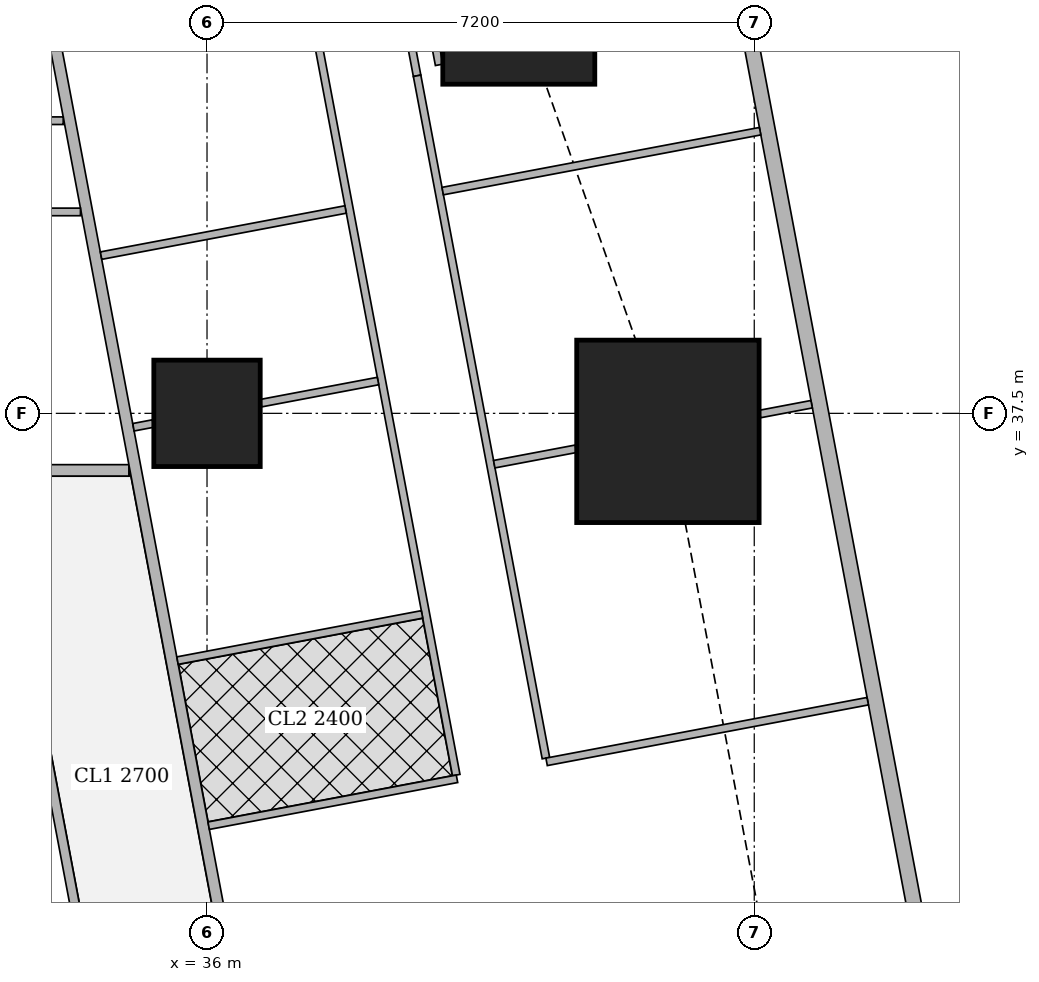
"""IFC4 building model, lengths in metres.
Left out: names, types, materials, properties, quantities, classifications, styles, units other than length and angle.
Written with IfcOpenShell. Run it as: python <this file> out.ifc"""

import sys

from ifc_helpers import new_model, si_unit, direction, frame, frame_2d, origin, origin_2d, place, context, subcontext, project, spatial, rectangle, extrude, element, fill, save


model = new_model("IFC4")
c1 = context("Model", 3, precision=1e-05, world=origin(), true_north=direction((0.0, 1.0)))
c2 = subcontext(c1, "Body", "Model", "MODEL_VIEW")
j1 = project(units=[si_unit("LENGTHUNIT", "METRE"), si_unit("PLANEANGLEUNIT", "RADIAN")], contexts=[c1])
p1 = place(None, origin())
s1 = spatial("IfcSite", under=j1, at=p1, CompositionType="ELEMENT")
p2 = place(p1, origin())
s2 = spatial("IfcBuilding", under=s1, at=p2, CompositionType="ELEMENT")
p3 = place(p2, frame((0.0, 0.0, 216.2)))
s3 = spatial("IfcBuildingStorey", under=s2, at=p3, CompositionType="ELEMENT", Elevation=216.2)
p4 = place(p3, frame((36.0, 37.5, 0.0), z_axis=(0.0, 0.0, 1.0), x_axis=(1.0, 0.0, 0.0)))
e1 = element("IfcColumn", 1, at=p4, inside=s3, PredefinedType="COLUMN", context=c2, shape_type="SweptSolid", body=[
    extrude(rectangle(XDim=1.4, YDim=1.4, at=origin_2d()), origin(), (0.0, 0.0, 1.0), 3.75),
])
p5 = place(p3, frame((42.064, 37.263, 0.0), z_axis=(0.0, 0.0, 1.0), x_axis=(1.0, 0.0, 0.0)))
e2 = element("IfcColumn", 2, at=p5, inside=s3, PredefinedType="COLUMN", context=c2, shape_type="SweptSolid", body=[
    extrude(rectangle(XDim=2.4, YDim=2.4, at=origin_2d()), origin(), (0.0, 0.0, 1.0), 3.75),
])
p6 = place(p3, frame((40.102, 42.83, 0.0), z_axis=(0.0, 0.0, 1.0), x_axis=(1.0, 0.0, 0.0)))
e3 = element("IfcColumn", 3, at=p6, inside=s3, PredefinedType="COLUMN", context=c2, shape_type="SweptSolid", body=[
    extrude(rectangle(XDim=2.0, YDim=2.0, at=origin_2d()), origin(), (0.0, 0.0, 1.0), 3.75),
])
p7 = place(p3, frame((50.653, 2.703, 0.0), z_axis=(0.0, 0.0, 1.0), x_axis=(-0.185612026696, 0.982623109613, 0.0)))
e4 = element("IfcWall", 4, at=p7, inside=s3, PredefinedType="SOLIDWALL", context=c2, shape_type="SweptSolid", body=[
    extrude(rectangle(XDim=41.393, YDim=0.2, at=frame_2d((20.697, 0.0))), origin(), (0.0, 0.0, 1.0), 3.5),
])
p8 = place(p7, frame((1.633, 0.0, 0.9)))
e5 = element("IfcOpeningElement", 5, at=p8, cuts=e4, PredefinedType="OPENING", context=c2, shape_type="SweptSolid", body=[
    extrude(rectangle(XDim=1.8, YDim=1.5, at=frame_2d((0.9, 0.75))), frame((0.0, 0.11, 0.0), z_axis=(0.0, -1.0, 0.0), x_axis=(1.0, 0.0, 0.0)), (0.0, 0.0, 1.0), 0.22),
])
p9 = place(p7, frame((6.032, 0.0, 0.9)))
e6 = element("IfcOpeningElement", 6, at=p9, cuts=e4, PredefinedType="OPENING", context=c2, shape_type="SweptSolid", body=[
    extrude(rectangle(XDim=1.8, YDim=1.5, at=frame_2d((0.9, 0.75))), frame((0.0, 0.11, 0.0), z_axis=(0.0, -1.0, 0.0), x_axis=(1.0, 0.0, 0.0)), (0.0, 0.0, 1.0), 0.22),
])
p10 = place(p7, frame((9.848, 0.0, 0.9)))
e7 = element("IfcOpeningElement", 7, at=p10, cuts=e4, PredefinedType="OPENING", context=c2, shape_type="SweptSolid", body=[
    extrude(rectangle(XDim=1.8, YDim=1.5, at=frame_2d((0.9, 0.75))), frame((0.0, 0.11, 0.0), z_axis=(0.0, -1.0, 0.0), x_axis=(1.0, 0.0, 0.0)), (0.0, 0.0, 1.0), 0.22),
])
p11 = place(p7, frame((13.664, 0.0, 0.9)))
e8 = element("IfcOpeningElement", 8, at=p11, cuts=e4, PredefinedType="OPENING", context=c2, shape_type="SweptSolid", body=[
    extrude(rectangle(XDim=1.8, YDim=1.5, at=frame_2d((0.9, 0.75))), frame((0.0, 0.11, 0.0), z_axis=(0.0, -1.0, 0.0), x_axis=(1.0, 0.0, 0.0)), (0.0, 0.0, 1.0), 0.22),
])
p12 = place(p7, frame((17.481, 0.0, 0.9)))
e9 = element("IfcOpeningElement", 9, at=p12, cuts=e4, PredefinedType="OPENING", context=c2, shape_type="SweptSolid", body=[
    extrude(rectangle(XDim=1.8, YDim=1.5, at=frame_2d((0.9, 0.75))), frame((0.0, 0.11, 0.0), z_axis=(0.0, -1.0, 0.0), x_axis=(1.0, 0.0, 0.0)), (0.0, 0.0, 1.0), 0.22),
])
p13 = place(p7, frame((21.297, 0.0, 0.9)))
e10 = element("IfcOpeningElement", 10, at=p13, cuts=e4, PredefinedType="OPENING", context=c2, shape_type="SweptSolid", body=[
    extrude(rectangle(XDim=1.8, YDim=1.5, at=frame_2d((0.9, 0.75))), frame((0.0, 0.11, 0.0), z_axis=(0.0, -1.0, 0.0), x_axis=(1.0, 0.0, 0.0)), (0.0, 0.0, 1.0), 0.22),
])
p14 = place(p7, frame((25.113, 0.0, 0.9)))
e11 = element("IfcOpeningElement", 11, at=p14, cuts=e4, PredefinedType="OPENING", context=c2, shape_type="SweptSolid", body=[
    extrude(rectangle(XDim=1.8, YDim=1.5, at=frame_2d((0.9, 0.75))), frame((0.0, 0.11, 0.0), z_axis=(0.0, -1.0, 0.0), x_axis=(1.0, 0.0, 0.0)), (0.0, 0.0, 1.0), 0.22),
])
p15 = place(p7, frame((28.93, 0.0, 0.9)))
e12 = element("IfcOpeningElement", 12, at=p15, cuts=e4, PredefinedType="OPENING", context=c2, shape_type="SweptSolid", body=[
    extrude(rectangle(XDim=1.8, YDim=1.5, at=frame_2d((0.9, 0.75))), frame((0.0, 0.11, 0.0), z_axis=(0.0, -1.0, 0.0), x_axis=(1.0, 0.0, 0.0)), (0.0, 0.0, 1.0), 0.22),
])
p16 = place(p7, frame((32.746, 0.0, 0.9)))
e13 = element("IfcOpeningElement", 13, at=p16, cuts=e4, PredefinedType="OPENING", context=c2, shape_type="SweptSolid", body=[
    extrude(rectangle(XDim=1.8, YDim=1.5, at=frame_2d((0.9, 0.75))), frame((0.0, 0.11, 0.0), z_axis=(0.0, -1.0, 0.0), x_axis=(1.0, 0.0, 0.0)), (0.0, 0.0, 1.0), 0.22),
])
p17 = place(p7, frame((36.481, 0.0, 0.9)))
e14 = element("IfcOpeningElement", 14, at=p17, cuts=e4, PredefinedType="OPENING", context=c2, shape_type="SweptSolid", body=[
    extrude(rectangle(XDim=1.8, YDim=1.5, at=frame_2d((0.9, 0.75))), frame((0.0, 0.11, 0.0), z_axis=(0.0, -1.0, 0.0), x_axis=(1.0, 0.0, 0.0)), (0.0, 0.0, 1.0), 0.22),
])
p18 = place(p3, frame((29.501, 36.75, 0.0), z_axis=(0.0, 0.0, 1.0), x_axis=(1.0, 0.0, 0.0)))
e15 = element("IfcWall", 15, at=p18, inside=s3, PredefinedType="SOLIDWALL", context=c2, shape_type="SweptSolid", body=[
    extrude(rectangle(XDim=5.471, YDim=0.15, at=frame_2d((2.735, 0.0))), origin(), (0.0, 0.0, 1.0), 3.5),
])
p19 = place(p3, frame((33.933, 42.73, 0.0), z_axis=(0.0, 0.0, 1.0), x_axis=(0.185595417643, -0.982626246825, 0.0)))
e16 = element("IfcWall", 16, at=p19, inside=s3, PredefinedType="SOLIDWALL", context=c2, shape_type="SweptSolid", body=[
    extrude(rectangle(XDim=41.051, YDim=0.15, at=frame_2d((20.525, 0.0))), origin(), (0.0, 0.0, 1.0), 2.5),
])
p20 = place(p19, frame((12.266, 0.0, 0.0)))
e17 = element("IfcOpeningElement", 17, at=p20, cuts=e16, PredefinedType="OPENING", context=c2, shape_type="SweptSolid", body=[
    extrude(rectangle(XDim=1.0, YDim=2.1, at=frame_2d((0.5, 1.05))), frame((0.0, 0.085, 0.0), z_axis=(0.0, -1.0, 0.0), x_axis=(1.0, 0.0, 0.0)), (0.0, 0.0, 1.0), 0.17),
])
p21 = place(p19, frame((16.082, 0.0, 0.0)))
e18 = element("IfcOpeningElement", 18, at=p21, cuts=e16, PredefinedType="OPENING", context=c2, shape_type="SweptSolid", body=[
    extrude(rectangle(XDim=1.0, YDim=2.1, at=frame_2d((0.5, 1.05))), frame((0.0, 0.085, 0.0), z_axis=(0.0, -1.0, 0.0), x_axis=(1.0, 0.0, 0.0)), (0.0, 0.0, 1.0), 0.17),
])
p22 = place(p19, frame((24.369, 0.0, 0.0)))
e19 = element("IfcOpeningElement", 19, at=p22, cuts=e16, PredefinedType="OPENING", context=c2, shape_type="SweptSolid", body=[
    extrude(rectangle(XDim=1.0, YDim=2.1, at=frame_2d((0.5, 1.05))), frame((0.0, 0.085, 0.0), z_axis=(0.0, -1.0, 0.0), x_axis=(1.0, 0.0, 0.0)), (0.0, 0.0, 1.0), 0.17),
])
p23 = place(p19, frame((30.862, 0.0, 0.0)))
e20 = element("IfcOpeningElement", 20, at=p23, cuts=e16, PredefinedType="OPENING", context=c2, shape_type="SweptSolid", body=[
    extrude(rectangle(XDim=1.0, YDim=2.1, at=frame_2d((0.5, 1.05))), frame((0.0, 0.085, 0.0), z_axis=(0.0, -1.0, 0.0), x_axis=(1.0, 0.0, 0.0)), (0.0, 0.0, 1.0), 0.17),
])
p24 = place(p3, frame((39.054, 42.085, 0.0), z_axis=(0.0, 0.0, 1.0), x_axis=(-0.185791584218, 0.982589175207, 0.0)))
e21 = element("IfcWall", 21, at=p24, inside=s3, PredefinedType="PARTITIONING", context=c2, shape_type="SweptSolid", body=[
    extrude(rectangle(XDim=3.628, YDim=0.1, at=frame_2d((1.814, 0.0))), origin(), (0.0, 0.0, 1.0), 2.05),
])
p25 = place(p3, frame((38.256, 44.628, 0.0), z_axis=(0.0, 0.0, 1.0), x_axis=(0.185700639943, -0.982606366927, 0.0)))
e22 = element("IfcWall", 22, at=p25, inside=s3, PredefinedType="PARTITIONING", context=c2, shape_type="SweptSolid", body=[
    extrude(rectangle(XDim=2.735, YDim=0.1, at=frame_2d((1.367, 0.0))), origin(), (0.0, 0.0, 1.0), 2.05),
])
p26 = place(p3, frame((38.764, 41.941, 0.0), z_axis=(0.0, 0.0, 1.0), x_axis=(0.185548572312, -0.982635093671, 0.0)))
e23 = element("IfcWall", 23, at=p26, inside=s3, PredefinedType="PARTITIONING", context=c2, shape_type="SweptSolid", body=[
    extrude(rectangle(XDim=9.135, YDim=0.1, at=frame_2d((4.568, 0.0))), origin(), (0.0, 0.0, 1.0), 3.5),
])
p27 = place(p26, frame((8.085, 0.0, 0.0)))
e24 = element("IfcOpeningElement", 24, at=p27, cuts=e23, PredefinedType="OPENING", context=c2, shape_type="SweptSolid", body=[
    extrude(rectangle(XDim=0.9, YDim=2.1, at=frame_2d((0.45, 1.05))), frame((0.0, 0.06, 0.0), z_axis=(0.0, -1.0, 0.0), x_axis=(1.0, 0.0, 0.0)), (0.0, 0.0, 1.0), 0.12),
])
p28 = place(p26, frame((3.7, 0.0, 0.0)))
e25 = element("IfcOpeningElement", 25, at=p28, cuts=e23, PredefinedType="OPENING", context=c2, shape_type="SweptSolid", body=[
    extrude(rectangle(XDim=0.9, YDim=2.1, at=frame_2d((0.45, 1.05))), frame((0.0, 0.06, 0.0), z_axis=(0.0, -1.0, 0.0), x_axis=(1.0, 0.0, 0.0)), (0.0, 0.0, 1.0), 0.12),
])
p29 = place(p3, frame((37.473, 42.309, 0.0), z_axis=(0.0, 0.0, 1.0), x_axis=(0.185491912953, -0.982645790827, 0.0)))
e26 = element("IfcWall", 26, at=p29, inside=s3, PredefinedType="PARTITIONING", context=c2, shape_type="SweptSolid", body=[
    extrude(rectangle(XDim=9.737, YDim=0.1, at=frame_2d((4.869, 0.0))), origin(), (0.0, 0.0, 1.0), 3.5),
])
p30 = place(p29, frame((8.232, 0.0, 0.0)))
e27 = element("IfcOpeningElement", 27, at=p30, cuts=e26, PredefinedType="OPENING", context=c2, shape_type="SweptSolid", body=[
    extrude(rectangle(XDim=0.9, YDim=2.1, at=frame_2d((0.45, 1.05))), frame((0.0, 0.06, 0.0), z_axis=(0.0, -1.0, 0.0), x_axis=(1.0, 0.0, 0.0)), (0.0, 0.0, 1.0), 0.12),
])
p31 = place(p29, frame((2.853, 0.0, 0.0)))
e28 = element("IfcOpeningElement", 28, at=p31, cuts=e26, PredefinedType="OPENING", context=c2, shape_type="SweptSolid", body=[
    extrude(rectangle(XDim=0.9, YDim=2.1, at=frame_2d((0.45, 1.05))), frame((0.0, 0.06, 0.0), z_axis=(0.0, -1.0, 0.0), x_axis=(1.0, 0.0, 0.0)), (0.0, 0.0, 1.0), 0.12),
])
p32 = place(p29, frame((5.564, 0.0, 0.0)))
e29 = element("IfcOpeningElement", 29, at=p32, cuts=e26, PredefinedType="OPENING", context=c2, shape_type="SweptSolid", body=[
    extrude(rectangle(XDim=0.9, YDim=2.1, at=frame_2d((0.45, 1.05))), frame((0.0, 0.06, 0.0), z_axis=(0.0, -1.0, 0.0), x_axis=(1.0, 0.0, 0.0)), (0.0, 0.0, 1.0), 0.12),
])
p33 = place(p3, frame((43.277, 41.212, 0.0), z_axis=(0.0, 0.0, 1.0), x_axis=(-0.982665405803, -0.185387972203, 0.0)))
e30 = element("IfcWall", 30, at=p33, inside=s3, PredefinedType="PARTITIONING", context=c2, shape_type="SweptSolid", body=[
    extrude(rectangle(XDim=4.25, YDim=0.1, at=frame_2d((2.125, 0.0))), origin(), (0.0, 0.0, 1.0), 2.05),
])
p34 = place(p3, frame((43.955, 37.62, 0.0), z_axis=(0.0, 0.0, 1.0), x_axis=(-0.982495415327, -0.186286765128, 0.0)))
e31 = element("IfcWall", 31, at=p34, inside=s3, PredefinedType="PARTITIONING", context=c2, shape_type="SweptSolid", body=[
    extrude(rectangle(XDim=0.693, YDim=0.1, at=frame_2d((0.347, 0.0))), origin(), (0.0, 0.0, 1.0), 3.5),
])
p35 = place(p3, frame((40.854, 37.034, 0.0), z_axis=(0.0, 0.0, 1.0), x_axis=(-0.982651678759, -0.185460718839, 0.0)))
e32 = element("IfcWall", 32, at=p35, inside=s3, PredefinedType="PARTITIONING", context=c2, shape_type="SweptSolid", body=[
    extrude(rectangle(XDim=1.094, YDim=0.1, at=frame_2d((0.547, 0.0))), origin(), (0.0, 0.0, 1.0), 3.5),
])
p36 = place(p3, frame((44.693, 33.713, 0.0), z_axis=(0.0, 0.0, 1.0), x_axis=(-0.982633535512, -0.185556823879, 0.0)))
e33 = element("IfcWall", 33, at=p36, inside=s3, PredefinedType="PARTITIONING", context=c2, shape_type="SweptSolid", body=[
    extrude(rectangle(XDim=4.3, YDim=0.1, at=frame_2d((2.15, 0.0))), origin(), (0.0, 0.0, 1.0), 2.05),
])
p37 = place(p3, frame((37.823, 40.182, 0.0), z_axis=(0.0, 0.0, 1.0), x_axis=(-0.982664729897, -0.18539155487, 0.0)))
e34 = element("IfcWall", 34, at=p37, inside=s3, PredefinedType="PARTITIONING", context=c2, shape_type="SweptSolid", body=[
    extrude(rectangle(XDim=3.274, YDim=0.1, at=frame_2d((1.637, 0.0))), origin(), (0.0, 0.0, 1.0), 3.5),
])
p38 = place(p3, frame((38.25, 37.925, 0.0), z_axis=(0.0, 0.0, 1.0), x_axis=(-0.982610209589, -0.185680305934, 0.0)))
e35 = element("IfcWall", 35, at=p38, inside=s3, PredefinedType="PARTITIONING", context=c2, shape_type="SweptSolid", body=[
    extrude(rectangle(XDim=1.567, YDim=0.1, at=frame_2d((0.784, 0.0))), origin(), (0.0, 0.0, 1.0), 3.5),
])
p39 = place(p3, frame((35.29, 37.366, 0.0), z_axis=(0.0, 0.0, 1.0), x_axis=(-0.982395465615, -0.18681313963, 0.0)))
e36 = element("IfcWall", 36, at=p39, inside=s3, PredefinedType="PARTITIONING", context=c2, shape_type="SweptSolid", body=[
    extrude(rectangle(XDim=0.263, YDim=0.1, at=frame_2d((0.131, 0.0))), origin(), (0.0, 0.0, 1.0), 3.5),
])
p40 = place(p3, frame((39.289, 32.692, 0.0), z_axis=(0.0, 0.0, 1.0), x_axis=(-0.982633623707, -0.185556356831, 0.0)))
e37 = element("IfcWall", 37, at=p40, inside=s3, PredefinedType="PARTITIONING", context=c2, shape_type="SweptSolid", body=[
    extrude(rectangle(XDim=3.325, YDim=0.1, at=frame_2d((1.663, 0.0))), origin(), (0.0, 0.0, 1.0), 3.5),
])
p41 = place(p3, frame((38.829, 34.855, 0.0), z_axis=(0.0, 0.0, 1.0), x_axis=(-0.982610347627, -0.185679575441, 0.0)))
e38 = element("IfcWall", 38, at=p41, inside=s3, PredefinedType="PARTITIONING", context=c2, shape_type="SweptSolid", body=[
    extrude(rectangle(XDim=3.274, YDim=0.1, at=frame_2d((1.637, 0.0))), origin(), (0.0, 0.0, 1.0), 3.5),
])
p42 = place(p3, frame((28.8, 41.35, 0.0), z_axis=(0.0, 0.0, 1.0), x_axis=(1.0, 0.0, 0.0)))
e39 = element("IfcWall", 39, at=p42, inside=s3, PredefinedType="PARTITIONING", context=c2, shape_type="SweptSolid", body=[
    extrude(rectangle(XDim=5.308, YDim=0.1, at=frame_2d((2.654, 0.0))), origin(), (0.0, 0.0, 1.0), 3.5),
])
p43 = place(p42, frame((1.25, 0.0, 0.0)))
e40 = element("IfcOpeningElement", 40, at=p43, cuts=e39, PredefinedType="OPENING", context=c2, shape_type="SweptSolid", body=[
    extrude(rectangle(XDim=0.9, YDim=2.1, at=frame_2d((0.45, 1.05))), frame((0.0, 0.06, 0.0), z_axis=(0.0, -1.0, 0.0), x_axis=(1.0, 0.0, 0.0)), (0.0, 0.0, 1.0), 0.12),
])
p44 = place(p3, frame((28.8, 40.15, 0.0), z_axis=(0.0, 0.0, 1.0), x_axis=(1.0, 0.0, 0.0)))
e41 = element("IfcWall", 41, at=p44, inside=s3, PredefinedType="PARTITIONING", context=c2, shape_type="SweptSolid", body=[
    extrude(rectangle(XDim=5.535, YDim=0.1, at=frame_2d((2.768, 0.0))), origin(), (0.0, 0.0, 1.0), 3.5),
])
p45 = place(p44, frame((0.655, 0.0, 0.0)))
e42 = element("IfcOpeningElement", 42, at=p45, cuts=e41, PredefinedType="OPENING", context=c2, shape_type="SweptSolid", body=[
    extrude(rectangle(XDim=0.9, YDim=2.1, at=frame_2d((0.45, 1.05))), frame((0.0, 0.06, 0.0), z_axis=(0.0, -1.0, 0.0), x_axis=(1.0, 0.0, 0.0)), (0.0, 0.0, 1.0), 0.12),
])
p46 = place(p44, frame((4.481, 0.0, 0.0)))
e43 = element("IfcOpeningElement", 43, at=p46, cuts=e41, PredefinedType="OPENING", context=c2, shape_type="SweptSolid", body=[
    extrude(rectangle(XDim=0.9, YDim=2.1, at=frame_2d((0.45, 1.05))), frame((0.0, 0.06, 0.0), z_axis=(0.0, -1.0, 0.0), x_axis=(1.0, 0.0, 0.0)), (0.0, 0.0, 1.0), 0.12),
])
p47 = place(p44, frame((2.455, 0.0, 0.0)))
e44 = element("IfcOpeningElement", 44, at=p47, cuts=e41, PredefinedType="OPENING", context=c2, shape_type="SweptSolid", body=[
    extrude(rectangle(XDim=0.9, YDim=2.1, at=frame_2d((0.45, 1.05))), frame((0.0, 0.06, 0.0), z_axis=(0.0, -1.0, 0.0), x_axis=(1.0, 0.0, 0.0)), (0.0, 0.0, 1.0), 0.12),
])
p48 = place(p3, frame((38.202, 10.163, 0.0), z_axis=(0.0, 0.0, 1.0), x_axis=(-0.185610321132, 0.982623431783, 0.0)))
e45 = element("IfcWall", 45, at=p48, inside=s3, PredefinedType="PARTITIONING", context=c2, shape_type="SweptSolid", body=[
    extrude(rectangle(XDim=25.111, YDim=0.125, at=frame_2d((12.556, 0.0))), origin(), (0.0, 0.0, 1.0), 2.5),
])
p49 = place(p48, frame((0.708, 0.0, 0.0)))
e46 = element("IfcOpeningElement", 46, at=p49, cuts=e45, PredefinedType="OPENING", context=c2, shape_type="SweptSolid", body=[
    extrude(rectangle(XDim=1.0, YDim=2.1, at=frame_2d((0.5, 1.05))), frame((0.0, 0.073, 0.0), z_axis=(0.0, -1.0, 0.0), x_axis=(1.0, 0.0, 0.0)), (0.0, 0.0, 1.0), 0.145),
])
p50 = place(p48, frame((5.9, 0.0, 0.0)))
e47 = element("IfcOpeningElement", 47, at=p50, cuts=e45, PredefinedType="OPENING", context=c2, shape_type="SweptSolid", body=[
    extrude(rectangle(XDim=1.0, YDim=2.1, at=frame_2d((0.5, 1.05))), frame((0.0, 0.073, 0.0), z_axis=(0.0, -1.0, 0.0), x_axis=(1.0, 0.0, 0.0)), (0.0, 0.0, 1.0), 0.145),
])
p51 = place(p48, frame((13.378, 0.0, 0.0)))
e48 = element("IfcOpeningElement", 48, at=p51, cuts=e45, PredefinedType="OPENING", context=c2, shape_type="SweptSolid", body=[
    extrude(rectangle(XDim=1.0, YDim=2.1, at=frame_2d((0.5, 1.05))), frame((0.0, 0.073, 0.0), z_axis=(0.0, -1.0, 0.0), x_axis=(1.0, 0.0, 0.0)), (0.0, 0.0, 1.0), 0.145),
])
p52 = place(p48, frame((21.15, 0.0, 0.0)))
e49 = element("IfcOpeningElement", 49, at=p52, cuts=e45, PredefinedType="OPENING", context=c2, shape_type="SweptSolid", body=[
    extrude(rectangle(XDim=1.0, YDim=2.1, at=frame_2d((0.5, 1.05))), frame((0.0, 0.073, 0.0), z_axis=(0.0, -1.0, 0.0), x_axis=(1.0, 0.0, 0.0)), (0.0, 0.0, 1.0), 0.145),
])
p53 = place(p15, origin())
e50 = element("IfcWindow", 50, at=p53, inside=s3, PartitioningType="SINGLE_PANEL", PredefinedType="WINDOW", context=c2, shape_type="SweptSolid", body=[
    extrude(rectangle(XDim=1.8, YDim=1.5, at=frame_2d((0.9, 0.75))), frame((0.0, 0.03, 0.0), z_axis=(0.0, -1.0, 0.0), x_axis=(1.0, 0.0, 0.0)), (0.0, 0.0, 1.0), 0.06),
])
fill(e12, e50)
p54 = place(p16, origin())
e51 = element("IfcWindow", 51, at=p54, inside=s3, PartitioningType="SINGLE_PANEL", PredefinedType="WINDOW", context=c2, shape_type="SweptSolid", body=[
    extrude(rectangle(XDim=1.8, YDim=1.5, at=frame_2d((0.9, 0.75))), frame((0.0, 0.03, 0.0), z_axis=(0.0, -1.0, 0.0), x_axis=(1.0, 0.0, 0.0)), (0.0, 0.0, 1.0), 0.06),
])
fill(e13, e51)
p55 = place(p17, origin())
e52 = element("IfcWindow", 52, at=p55, inside=s3, PartitioningType="SINGLE_PANEL", PredefinedType="WINDOW", context=c2, shape_type="SweptSolid", body=[
    extrude(rectangle(XDim=1.8, YDim=1.5, at=frame_2d((0.9, 0.75))), frame((0.0, 0.03, 0.0), z_axis=(0.0, -1.0, 0.0), x_axis=(1.0, 0.0, 0.0)), (0.0, 0.0, 1.0), 0.06),
])
fill(e14, e52)
p56 = place(p27, origin())
e53 = element("IfcDoor", 53, at=p56, inside=s3, OperationType="SINGLE_SWING_RIGHT", PredefinedType="DOOR", context=c2, shape_type="SweptSolid", body=[
    extrude(rectangle(XDim=0.9, YDim=2.1, at=frame_2d((0.45, 1.05))), frame((0.0, 0.025, 0.0), z_axis=(0.0, -1.0, 0.0), x_axis=(1.0, 0.0, 0.0)), (0.0, 0.0, 1.0), 0.05),
])
fill(e24, e53)
p57 = place(p28, origin())
e54 = element("IfcDoor", 54, at=p57, inside=s3, OperationType="SINGLE_SWING_RIGHT", PredefinedType="DOOR", context=c2, shape_type="SweptSolid", body=[
    extrude(rectangle(XDim=0.9, YDim=2.1, at=frame_2d((0.45, 1.05))), frame((0.0, 0.025, 0.0), z_axis=(0.0, -1.0, 0.0), x_axis=(1.0, 0.0, 0.0)), (0.0, 0.0, 1.0), 0.05),
])
fill(e25, e54)
p58 = place(p30, origin())
e55 = element("IfcDoor", 55, at=p58, inside=s3, OperationType="SINGLE_SWING_LEFT", PredefinedType="DOOR", context=c2, shape_type="SweptSolid", body=[
    extrude(rectangle(XDim=0.9, YDim=2.1, at=frame_2d((0.45, 1.05))), frame((0.0, 0.025, 0.0), z_axis=(0.0, -1.0, 0.0), x_axis=(1.0, 0.0, 0.0)), (0.0, 0.0, 1.0), 0.05),
])
fill(e27, e55)
p59 = place(p31, origin())
e56 = element("IfcDoor", 56, at=p59, inside=s3, OperationType="SINGLE_SWING_LEFT", PredefinedType="DOOR", context=c2, shape_type="SweptSolid", body=[
    extrude(rectangle(XDim=0.9, YDim=2.1, at=frame_2d((0.45, 1.05))), frame((0.0, 0.025, 0.0), z_axis=(0.0, -1.0, 0.0), x_axis=(1.0, 0.0, 0.0)), (0.0, 0.0, 1.0), 0.05),
])
fill(e28, e56)
p60 = place(p32, origin())
e57 = element("IfcDoor", 57, at=p60, inside=s3, OperationType="SINGLE_SWING_LEFT", PredefinedType="DOOR", context=c2, shape_type="SweptSolid", body=[
    extrude(rectangle(XDim=0.9, YDim=2.1, at=frame_2d((0.45, 1.05))), frame((0.0, 0.025, 0.0), z_axis=(0.0, -1.0, 0.0), x_axis=(1.0, 0.0, 0.0)), (0.0, 0.0, 1.0), 0.05),
])
fill(e29, e57)
p61 = place(p46, origin())
e58 = element("IfcDoor", 58, at=p61, inside=s3, OperationType="SINGLE_SWING_LEFT", PredefinedType="DOOR", context=c2, shape_type="SweptSolid", body=[
    extrude(rectangle(XDim=0.9, YDim=2.1, at=frame_2d((0.45, 1.05))), frame((0.0, 0.025, 0.0), z_axis=(0.0, -1.0, 0.0), x_axis=(1.0, 0.0, 0.0)), (0.0, 0.0, 1.0), 0.05),
])
fill(e43, e58)
p62 = place(p52, origin())
e59 = element("IfcDoor", 59, at=p62, inside=s3, OperationType="SINGLE_SWING_LEFT", PredefinedType="DOOR", context=c2, shape_type="SweptSolid", body=[
    extrude(rectangle(XDim=1.0, YDim=2.1, at=frame_2d((0.5, 1.05))), frame((0.0, 0.025, 0.0), z_axis=(0.0, -1.0, 0.0), x_axis=(1.0, 0.0, 0.0)), (0.0, 0.0, 1.0), 0.05),
])
fill(e49, e59)
save(model, sys.argv[1])
